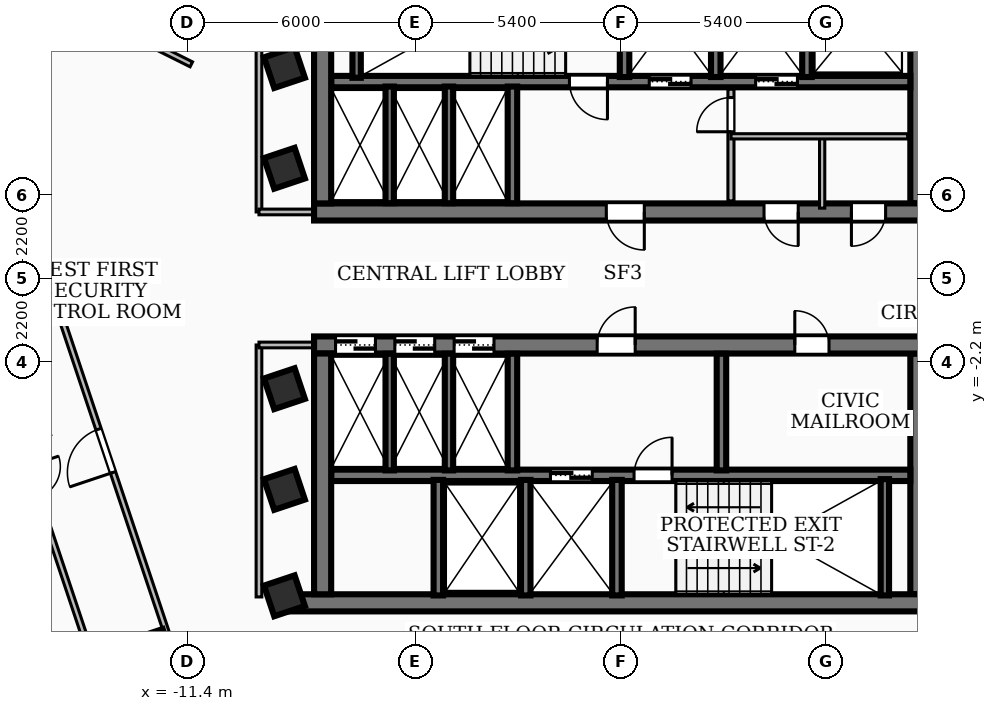
"""IFC4 building model, lengths in metres.
Left out: names, types, materials, properties, quantities, classifications, styles, units other than length and angle.
Written with IfcOpenShell. Run it as: python <this file> out.ifc"""

import sys

from ifc_helpers import new_model, si_unit, direction, frame, frame_2d, origin, origin_2d, place, context, subcontext, project, spatial, rectangle, i_section, extrude, element, fill, save


model = new_model("IFC4")
c1 = context("Model", 3, precision=1e-05, world=origin(), true_north=direction((0.0, 1.0)))
c2 = subcontext(c1, "Body", "Model", "MODEL_VIEW")
j1 = project(units=[si_unit("LENGTHUNIT", "METRE"), si_unit("PLANEANGLEUNIT", "RADIAN")], contexts=[c1])
p1 = place(None, origin())
s1 = spatial("IfcSite", under=j1, at=p1, CompositionType="ELEMENT")
p2 = place(p1, origin())
s2 = spatial("IfcBuilding", under=s1, at=p2, CompositionType="ELEMENT")
p3 = place(p2, frame((0.0, 0.0, 159.48)))
s3 = spatial("IfcBuildingStorey", under=s2, at=p3, CompositionType="ELEMENT", Elevation=159.48)
p4 = place(p3, frame((8.07, 1.75, 0.0), z_axis=(0.0, 0.0, 1.0), x_axis=(-1.0, 0.0, 0.0)))
e1 = element("IfcWall", 1, at=p4, inside=s3, PredefinedType="SHEAR", context=c2, shape_type="SweptSolid", body=[
    extrude(rectangle(XDim=16.14, YDim=0.45, at=frame_2d((8.07, 0.0))), origin(), (0.0, 0.0, 1.0), 3.34),
])
p5 = place(p4, frame((7.45, 0.0, 0.0)))
e2 = element("IfcOpeningElement", 2, at=p5, cuts=e1, PredefinedType="OPENING", context=c2, shape_type="SweptSolid", body=[
    extrude(rectangle(XDim=1.0, YDim=2.1, at=frame_2d((0.5, 1.05))), frame((0.0, 0.235, 0.0), z_axis=(0.0, -1.0, 0.0), x_axis=(1.0, 0.0, 0.0)), (0.0, 0.0, 1.0), 0.47),
])
p6 = place(p4, frame((3.4, 0.0, 0.0)))
e3 = element("IfcOpeningElement", 3, at=p6, cuts=e1, PredefinedType="OPENING", context=c2, shape_type="SweptSolid", body=[
    extrude(rectangle(XDim=0.9, YDim=2.06, at=frame_2d((0.45, 1.03))), frame((0.0, 0.235, 0.0), z_axis=(0.0, -1.0, 0.0), x_axis=(1.0, 0.0, 0.0)), (0.0, 0.0, 1.0), 0.47),
])
p7 = place(p4, frame((1.1, 0.0, 0.0)))
e4 = element("IfcOpeningElement", 4, at=p7, cuts=e1, PredefinedType="OPENING", context=c2, shape_type="SweptSolid", body=[
    extrude(rectangle(XDim=0.9, YDim=2.06, at=frame_2d((0.45, 1.03))), frame((0.0, 0.235, 0.0), z_axis=(0.0, -1.0, 0.0), x_axis=(1.0, 0.0, 0.0)), (0.0, 0.0, 1.0), 0.47),
])
for number, where, z_axis, x_axis in (
    (5, (-7.845, 1.975, 0.0), (0.0, 0.0, 1.0), (0.0, 1.0, 0.0)),
    (6, (7.845, 8.31, 0.0), (0.0, 0.0, 1.0), (0.0, -1.0, 0.0)),
):
    element("IfcWall", number, at=place(p3, frame(where, z_axis=z_axis, x_axis=x_axis)), inside=s3, PredefinedType="SHEAR", context=c2, shape_type="SweptSolid", body=[
        extrude(rectangle(XDim=6.335, YDim=0.45, at=frame_2d((3.167, 0.0))), origin(), (0.0, 0.0, 1.0), 3.34),
    ])
p8 = place(p3, frame((7.62, 5.18, 0.0), z_axis=(0.0, 0.0, 1.0), x_axis=(-1.0, 0.0, 0.0)))
e7 = element("IfcWall", 7, at=p8, inside=s3, PredefinedType="SOLIDWALL", context=c2, shape_type="SweptSolid", body=[
    extrude(rectangle(XDim=15.24, YDim=0.3, at=frame_2d((7.62, 0.0))), origin(), (0.0, 0.0, 1.0), 3.34),
])
p9 = place(p8, frame((5.77, 0.0, 0.0)))
e8 = element("IfcOpeningElement", 8, at=p9, cuts=e7, PredefinedType="OPENING", context=c2, shape_type="SweptSolid", body=[
    extrude(rectangle(XDim=1.1, YDim=2.15, at=frame_2d((0.55, 1.075))), frame((0.0, 0.16, 0.0), z_axis=(0.0, -1.0, 0.0), x_axis=(1.0, 0.0, 0.0)), (0.0, 0.0, 1.0), 0.32),
])
p10 = place(p8, frame((2.97, 0.0, 0.0)))
e9 = element("IfcOpeningElement", 9, at=p10, cuts=e7, PredefinedType="OPENING", context=c2, shape_type="SweptSolid", body=[
    extrude(rectangle(XDim=1.1, YDim=2.15, at=frame_2d((0.55, 1.075))), frame((0.0, 0.16, 0.0), z_axis=(0.0, -1.0, 0.0), x_axis=(1.0, 0.0, 0.0)), (0.0, 0.0, 1.0), 0.32),
])
p11 = place(p8, frame((7.97, 0.0, 0.0)))
e10 = element("IfcOpeningElement", 10, at=p11, cuts=e7, PredefinedType="OPENING", context=c2, shape_type="SweptSolid", body=[
    extrude(rectangle(XDim=1.0, YDim=2.1, at=frame_2d((0.5, 1.05))), frame((0.0, 0.16, 0.0), z_axis=(0.0, -1.0, 0.0), x_axis=(1.0, 0.0, 0.0)), (0.0, 0.0, 1.0), 0.32),
])
p12 = place(p3, frame((8.78, -8.535, 0.0), z_axis=(0.0, 0.0, 1.0), x_axis=(-1.0, 0.0, 0.0)))
e11 = element("IfcWall", 11, at=p12, inside=s3, PredefinedType="SHEAR", context=c2, shape_type="SweptSolid", body=[
    extrude(rectangle(XDim=17.56, YDim=0.45, at=frame_2d((8.78, 0.0))), origin(), (0.0, 0.0, 1.0), 3.34),
])
p13 = place(p3, frame((-8.07, -1.75, 0.0), z_axis=(0.0, 0.0, 1.0), x_axis=(1.0, 0.0, 0.0)))
e12 = element("IfcWall", 12, at=p13, inside=s3, PredefinedType="SHEAR", context=c2, shape_type="SweptSolid", body=[
    extrude(rectangle(XDim=16.14, YDim=0.45, at=frame_2d((8.07, 0.0))), origin(), (0.0, 0.0, 1.0), 3.34),
])
p14 = place(p13, frame((7.45, 0.0, 0.0)))
e13 = element("IfcOpeningElement", 13, at=p14, cuts=e12, PredefinedType="OPENING", context=c2, shape_type="SweptSolid", body=[
    extrude(rectangle(XDim=1.0, YDim=2.1, at=frame_2d((0.5, 1.05))), frame((0.0, 0.235, 0.0), z_axis=(0.0, -1.0, 0.0), x_axis=(1.0, 0.0, 0.0)), (0.0, 0.0, 1.0), 0.47),
])
p15 = place(p13, frame((12.65, 0.0, 0.0)))
e14 = element("IfcOpeningElement", 14, at=p15, cuts=e12, PredefinedType="OPENING", context=c2, shape_type="SweptSolid", body=[
    extrude(rectangle(XDim=0.9, YDim=2.06, at=frame_2d((0.45, 1.03))), frame((0.0, 0.235, 0.0), z_axis=(0.0, -1.0, 0.0), x_axis=(1.0, 0.0, 0.0)), (0.0, 0.0, 1.0), 0.47),
])
p16 = place(p13, frame((0.565, 0.0, 0.0)))
e15 = element("IfcOpeningElement", 15, at=p16, cuts=e12, PredefinedType="OPENING", context=c2, shape_type="SweptSolid", body=[
    extrude(rectangle(XDim=1.05, YDim=2.15, at=frame_2d((0.525, 1.075))), frame((0.0, 0.235, 0.0), z_axis=(0.0, -1.0, 0.0), x_axis=(1.0, 0.0, 0.0)), (0.0, 0.0, 1.0), 0.47),
])
p17 = place(p13, frame((2.125, 0.0, 0.0)))
e16 = element("IfcOpeningElement", 16, at=p17, cuts=e12, PredefinedType="OPENING", context=c2, shape_type="SweptSolid", body=[
    extrude(rectangle(XDim=1.05, YDim=2.15, at=frame_2d((0.525, 1.075))), frame((0.0, 0.235, 0.0), z_axis=(0.0, -1.0, 0.0), x_axis=(1.0, 0.0, 0.0)), (0.0, 0.0, 1.0), 0.47),
])
p18 = place(p13, frame((3.685, 0.0, 0.0)))
e17 = element("IfcOpeningElement", 17, at=p18, cuts=e12, PredefinedType="OPENING", context=c2, shape_type="SweptSolid", body=[
    extrude(rectangle(XDim=1.05, YDim=2.15, at=frame_2d((0.525, 1.075))), frame((0.0, 0.235, 0.0), z_axis=(0.0, -1.0, 0.0), x_axis=(1.0, 0.0, 0.0)), (0.0, 0.0, 1.0), 0.47),
])
for number, where, z_axis, x_axis in (
    (18, (-7.845, -8.31, 0.0), (0.0, 0.0, 1.0), (0.0, 1.0, 0.0)),
    (19, (7.845, -1.975, 0.0), (0.0, 0.0, 1.0), (0.0, -1.0, 0.0)),
):
    element("IfcWall", number, at=place(p3, frame(where, z_axis=z_axis, x_axis=x_axis)), inside=s3, PredefinedType="SHEAR", context=c2, shape_type="SweptSolid", body=[
        extrude(rectangle(XDim=6.335, YDim=0.45, at=frame_2d((3.167, 0.0))), origin(), (0.0, 0.0, 1.0), 3.34),
    ])
p19 = place(p3, frame((-7.62, -5.18, 0.0), z_axis=(0.0, 0.0, 1.0), x_axis=(1.0, 0.0, 0.0)))
e20 = element("IfcWall", 20, at=p19, inside=s3, PredefinedType="SOLIDWALL", context=c2, shape_type="SweptSolid", body=[
    extrude(rectangle(XDim=15.24, YDim=0.3, at=frame_2d((7.62, 0.0))), origin(), (0.0, 0.0, 1.0), 3.34),
])
p20 = place(p19, frame((5.77, 0.0, 0.0)))
e21 = element("IfcOpeningElement", 21, at=p20, cuts=e20, PredefinedType="OPENING", context=c2, shape_type="SweptSolid", body=[
    extrude(rectangle(XDim=1.1, YDim=2.15, at=frame_2d((0.55, 1.075))), frame((0.0, 0.16, 0.0), z_axis=(0.0, -1.0, 0.0), x_axis=(1.0, 0.0, 0.0)), (0.0, 0.0, 1.0), 0.32),
])
p21 = place(p19, frame((7.97, 0.0, 0.0)))
e22 = element("IfcOpeningElement", 22, at=p21, cuts=e20, PredefinedType="OPENING", context=c2, shape_type="SweptSolid", body=[
    extrude(rectangle(XDim=1.0, YDim=2.1, at=frame_2d((0.5, 1.05))), frame((0.0, 0.16, 0.0), z_axis=(0.0, -1.0, 0.0), x_axis=(1.0, 0.0, 0.0)), (0.0, 0.0, 1.0), 0.32),
])
for number, where, z_axis, x_axis in (
    (23, (-6.95, 5.28, 0.0), (0.0, 0.0, 1.0), (0.0, 1.0, 0.0)),
    (24, (6.95, -8.34, 0.0), (0.0, 0.0, 1.0), (0.0, 1.0, 0.0)),
):
    element("IfcWall", number, at=place(p3, frame(where, z_axis=z_axis, x_axis=x_axis)), inside=s3, PredefinedType="SOLIDWALL", context=c2, shape_type="SweptSolid", body=[
        extrude(rectangle(XDim=3.06, YDim=0.22, at=frame_2d((1.53, 0.0))), origin(), (0.0, 0.0, 1.0), 3.34),
    ])
for number, where, z_axis, x_axis in (
    (25, (0.1, 5.3, 0.0), (0.0, 0.0, 1.0), (0.0, 1.0, 0.0)),
    (26, (2.5, 5.3, 0.0), (0.0, 0.0, 1.0), (0.0, 1.0, 0.0)),
    (27, (4.9, 5.3, 0.0), (0.0, 0.0, 1.0), (0.0, 1.0, 0.0)),
):
    element("IfcWall", number, at=place(p3, frame(where, z_axis=z_axis, x_axis=x_axis)), inside=s3, PredefinedType="SOLIDWALL", context=c2, shape_type="SweptSolid", body=[
        extrude(rectangle(XDim=3.04, YDim=0.25, at=frame_2d((1.52, 0.0))), origin(), (0.0, 0.0, 1.0), 3.34),
    ])
p22 = place(p3, frame((-2.85, 1.98, 0.0), z_axis=(0.0, 0.0, 1.0), x_axis=(0.0, 1.0, 0.0)))
e28 = element("IfcWall", 28, at=p22, inside=s3, PredefinedType="SOLIDWALL", context=c2, shape_type="SweptSolid", body=[
    extrude(rectangle(XDim=3.07, YDim=0.25, at=frame_2d((1.535, 0.0))), origin(), (0.0, 0.0, 1.0), 3.34),
])
for number, where, z_axis, x_axis in (
    (29, (-0.1, -8.34, 0.0), (0.0, 0.0, 1.0), (0.0, 1.0, 0.0)),
    (30, (-2.5, -8.34, 0.0), (0.0, 0.0, 1.0), (0.0, 1.0, 0.0)),
    (31, (-4.8, -8.34, 0.0), (0.0, 0.0, 1.0), (0.0, 1.0, 0.0)),
):
    element("IfcWall", number, at=place(p3, frame(where, z_axis=z_axis, x_axis=x_axis)), inside=s3, PredefinedType="SOLIDWALL", context=c2, shape_type="SweptSolid", body=[
        extrude(rectangle(XDim=3.04, YDim=0.25, at=frame_2d((1.52, 0.0))), origin(), (0.0, 0.0, 1.0), 3.34),
    ])
for number, where, z_axis, x_axis in (
    (32, (-2.85, -5.05, 0.0), (0.0, 0.0, 1.0), (0.0, 1.0, 0.0)),
    (33, (2.65, -5.05, 0.0), (0.0, 0.0, 1.0), (0.0, 1.0, 0.0)),
):
    element("IfcWall", number, at=place(p3, frame(where, z_axis=z_axis, x_axis=x_axis)), inside=s3, PredefinedType="SOLIDWALL", context=c2, shape_type="SweptSolid", body=[
        extrude(rectangle(XDim=3.07, YDim=0.25, at=frame_2d((1.535, 0.0))), origin(), (0.0, 0.0, 1.0), 3.34),
    ])
for number, where, z_axis, x_axis in (
    (34, (-6.08, 1.98, 0.0), (0.0, 0.0, 1.0), (0.0, 1.0, 0.0)),
    (35, (-4.52, 1.98, 0.0), (0.0, 0.0, 1.0), (0.0, 1.0, 0.0)),
    (36, (-6.08, -5.05, 0.0), (0.0, 0.0, 1.0), (0.0, 1.0, 0.0)),
    (37, (-4.52, -5.05, 0.0), (0.0, 0.0, 1.0), (0.0, 1.0, 0.0)),
):
    element("IfcWall", number, at=place(p3, frame(where, z_axis=z_axis, x_axis=x_axis)), inside=s3, PredefinedType="SOLIDWALL", context=c2, shape_type="SweptSolid", body=[
        extrude(rectangle(XDim=3.07, YDim=0.22, at=frame_2d((1.535, 0.0))), origin(), (0.0, 0.0, 1.0), 3.34),
    ])
for number, where, z_axis, x_axis in (
    (38, (-8.85, -5.55, 0.0), (0.0, 0.0, 1.0), (0.948, 0.317, 0.0)),
    (39, (-8.85, -2.9, 0.0), (0.0, 0.0, 1.0), (0.948, 0.317, 0.0)),
    (40, (-8.85, 2.9, 0.0), (0.0, 0.0, 1.0), (0.948, 0.317, 0.0)),
    (41, (-8.85, 5.55, 0.0), (0.0, 0.0, 1.0), (0.948, 0.317, 0.0)),
    (42, (-8.85, -8.35, 0.0), (0.0, 0.0, 1.0), (0.948, 0.317, 0.0)),
):
    element("IfcColumn", number, at=place(p3, frame(where, z_axis=z_axis, x_axis=x_axis)), inside=s3, PredefinedType="COLUMN", context=c2, shape_type="SweptSolid", body=[
        extrude(rectangle(XDim=0.85, YDim=0.85, at=origin_2d()), origin(), (0.0, 0.0, 1.0), 3.6),
    ])
p23 = place(p3, frame((-12.106, -9.731, 0.0), z_axis=(0.0, 0.0, 1.0), x_axis=(0.948323655206, 0.317304656405, 0.0)))
e43 = element("IfcColumn", 43, at=p23, inside=s3, PredefinedType="COLUMN", context=c2, shape_type="SweptSolid", body=[
    extrude(i_section(OverallWidth=0.418, OverallDepth=0.927, WebThickness=0.019, FlangeThickness=0.032, at=origin_2d()), origin(), (0.0, 0.0, 1.0), 3.6),
])
p24 = place(p3, frame((2.9, 2.04, 0.0), z_axis=(0.0, 0.0, 1.0), x_axis=(0.0, 1.0, 0.0)))
e44 = element("IfcWall", 44, at=p24, inside=s3, PredefinedType="PARTITIONING", context=c2, shape_type="SweptSolid", body=[
    extrude(rectangle(XDim=2.94, YDim=0.16, at=frame_2d((1.47, 0.0))), origin(), (0.0, 0.0, 1.0), 2.57),
])
p25 = place(p24, frame((1.82, 0.0, 0.0)))
e45 = element("IfcOpeningElement", 45, at=p25, cuts=e44, PredefinedType="OPENING", context=c2, shape_type="SweptSolid", body=[
    extrude(rectangle(XDim=0.9, YDim=2.06, at=frame_2d((0.45, 1.03))), frame((0.0, 0.09, 0.0), z_axis=(0.0, -1.0, 0.0), x_axis=(1.0, 0.0, 0.0)), (0.0, 0.0, 1.0), 0.18),
])
p26 = place(p3, frame((2.9, 3.74, 0.0), z_axis=(0.0, 0.0, 1.0), x_axis=(1.0, 0.0, 0.0)))
e46 = element("IfcWall", 46, at=p26, inside=s3, PredefinedType="PARTITIONING", context=c2, shape_type="SweptSolid", body=[
    extrude(rectangle(XDim=4.65, YDim=0.138, at=frame_2d((2.325, 0.0))), origin(), (0.0, 0.0, 1.0), 3.34),
])
p27 = place(p3, frame((5.3, 1.85, 0.0), z_axis=(0.0, 0.0, 1.0), x_axis=(0.0, 1.0, 0.0)))
e47 = element("IfcWall", 47, at=p27, inside=s3, PredefinedType="PARTITIONING", context=c2, shape_type="SweptSolid", body=[
    extrude(rectangle(XDim=1.89, YDim=0.138, at=frame_2d((0.945, 0.0))), origin(), (0.0, 0.0, 1.0), 2.57),
])
p28 = place(p3, frame((-9.52, 1.75, 0.0), z_axis=(0.0, 0.0, 1.0), x_axis=(0.0, 1.0, 0.0)))
e48 = element("IfcWall", 48, at=p28, inside=s3, PredefinedType="PARTITIONING", context=c2, shape_type="SweptSolid", body=[
    extrude(rectangle(XDim=6.63, YDim=0.15, at=frame_2d((3.315, 0.0))), origin(), (0.0, 0.0, 1.0), 3.34),
])
p29 = place(p3, frame((-7.85, 1.75, 0.0), z_axis=(0.0, 0.0, 1.0), x_axis=(-1.0, 0.0, 0.0)))
e49 = element("IfcWall", 49, at=p29, inside=s3, PredefinedType="PARTITIONING", context=c2, shape_type="SweptSolid", body=[
    extrude(rectangle(XDim=1.67, YDim=0.15, at=frame_2d((0.835, 0.0))), origin(), (0.0, 0.0, 1.0), 2.57),
])
p30 = place(p3, frame((-9.52, -8.38, 0.0), z_axis=(0.0, 0.0, 1.0), x_axis=(0.0, 1.0, 0.0)))
e50 = element("IfcWall", 50, at=p30, inside=s3, PredefinedType="PARTITIONING", context=c2, shape_type="SweptSolid", body=[
    extrude(rectangle(XDim=6.63, YDim=0.15, at=frame_2d((3.315, 0.0))), origin(), (0.0, 0.0, 1.0), 2.644),
])
p31 = place(p3, frame((-7.85, -1.75, 0.0), z_axis=(0.0, 0.0, 1.0), x_axis=(-1.0, 0.0, 0.0)))
e51 = element("IfcWall", 51, at=p31, inside=s3, PredefinedType="PARTITIONING", context=c2, shape_type="SweptSolid", body=[
    extrude(rectangle(XDim=1.67, YDim=0.15, at=frame_2d((0.835, 0.0))), origin(), (0.0, 0.0, 1.0), 2.57),
])
p32 = place(p3, frame((-11.3, 5.634, 0.0), z_axis=(0.0, 0.0, 1.0), x_axis=(-0.894904738475, 0.446257222972, 0.0)))
e52 = element("IfcWall", 52, at=p32, inside=s3, PredefinedType="PARTITIONING", context=c2, shape_type="SweptSolid", body=[
    extrude(rectangle(XDim=7.048, YDim=0.145, at=frame_2d((3.524, 0.0))), origin(), (0.0, 0.0, 1.0), 3.34),
])
p33 = place(p3, frame((-10.372, -14.037, 0.0), z_axis=(0.0, 0.0, 1.0), x_axis=(-0.317298382655, 0.94832575435, 0.0)))
e53 = element("IfcWall", 53, at=p33, inside=s3, PredefinedType="PARTITIONING", context=c2, shape_type="SweptSolid", body=[
    extrude(rectangle(XDim=20.041, YDim=0.145, at=frame_2d((10.021, 0.0))), origin(), (0.0, 0.0, 1.0), 2.644),
])
p34 = place(p33, frame((9.42, 0.0, 0.0)))
e54 = element("IfcOpeningElement", 54, at=p34, cuts=e53, PredefinedType="OPENING", context=c2, shape_type="SweptSolid", body=[
    extrude(rectangle(XDim=1.2, YDim=2.1, at=frame_2d((0.6, 1.05))), frame((0.0, 0.083, 0.0), z_axis=(0.0, -1.0, 0.0), x_axis=(1.0, 0.0, 0.0)), (0.0, 0.0, 1.0), 0.165),
])
p35 = place(p3, frame((-17.496, 0.7, 0.0), z_axis=(0.0, 0.0, 1.0), x_axis=(0.317299961245, -0.948325226172, 0.0)))
e55 = element("IfcWall", 55, at=p35, inside=s3, PredefinedType="PARTITIONING", context=c2, shape_type="SweptSolid", body=[
    extrude(rectangle(XDim=12.43, YDim=0.145, at=frame_2d((6.215, 0.0))), origin(), (0.0, 0.0, 1.0), 2.644),
])
p36 = place(p35, frame((4.515, 0.0, 0.0)))
e56 = element("IfcOpeningElement", 56, at=p36, cuts=e55, PredefinedType="OPENING", context=c2, shape_type="SweptSolid", body=[
    extrude(rectangle(XDim=0.86, YDim=2.04, at=frame_2d((0.43, 1.02))), frame((0.0, 0.083, 0.0), z_axis=(0.0, -1.0, 0.0), x_axis=(1.0, 0.0, 0.0)), (0.0, 0.0, 1.0), 0.165),
])
p37 = place(p35, frame((5.955, 0.0, 0.0)))
e57 = element("IfcOpeningElement", 57, at=p37, cuts=e55, PredefinedType="OPENING", context=c2, shape_type="SweptSolid", body=[
    extrude(rectangle(XDim=0.86, YDim=2.04, at=frame_2d((0.43, 1.02))), frame((0.0, 0.083, 0.0), z_axis=(0.0, -1.0, 0.0), x_axis=(1.0, 0.0, 0.0)), (0.0, 0.0, 1.0), 0.165),
])
p38 = place(p5, origin())
e58 = element("IfcDoor", 58, at=p38, inside=s3, OperationType="SINGLE_SWING_LEFT", PredefinedType="DOOR", context=c2, shape_type="SweptSolid", body=[
    extrude(rectangle(XDim=1.0, YDim=2.1, at=frame_2d((0.5, 1.05))), frame((0.0, 0.025, 0.0), z_axis=(0.0, -1.0, 0.0), x_axis=(1.0, 0.0, 0.0)), (0.0, 0.0, 1.0), 0.05),
])
fill(e2, e58)
p39 = place(p14, origin())
e59 = element("IfcDoor", 59, at=p39, inside=s3, OperationType="SINGLE_SWING_RIGHT", PredefinedType="DOOR", context=c2, shape_type="SweptSolid", body=[
    extrude(rectangle(XDim=1.0, YDim=2.1, at=frame_2d((0.5, 1.05))), frame((0.0, 0.025, 0.0), z_axis=(0.0, -1.0, 0.0), x_axis=(1.0, 0.0, 0.0)), (0.0, 0.0, 1.0), 0.05),
])
fill(e13, e59)
p40 = place(p9, origin())
e60 = element("IfcDoor", 60, at=p40, inside=s3, OperationType="DOUBLE_DOOR_SLIDING", PredefinedType="DOOR", context=c2, shape_type="SweptSolid", body=[
    extrude(rectangle(XDim=1.1, YDim=2.15, at=frame_2d((0.55, 1.075))), frame((0.0, 0.025, 0.0), z_axis=(0.0, -1.0, 0.0), x_axis=(1.0, 0.0, 0.0)), (0.0, 0.0, 1.0), 0.05),
])
fill(e8, e60)
p41 = place(p10, origin())
e61 = element("IfcDoor", 61, at=p41, inside=s3, OperationType="DOUBLE_DOOR_SLIDING", PredefinedType="DOOR", context=c2, shape_type="SweptSolid", body=[
    extrude(rectangle(XDim=1.1, YDim=2.15, at=frame_2d((0.55, 1.075))), frame((0.0, 0.025, 0.0), z_axis=(0.0, -1.0, 0.0), x_axis=(1.0, 0.0, 0.0)), (0.0, 0.0, 1.0), 0.05),
])
fill(e9, e61)
p42 = place(p11, origin())
e62 = element("IfcDoor", 62, at=p42, inside=s3, OperationType="SINGLE_SWING_LEFT", PredefinedType="DOOR", context=c2, shape_type="SweptSolid", body=[
    extrude(rectangle(XDim=1.0, YDim=2.1, at=frame_2d((0.5, 1.05))), frame((0.0, 0.025, 0.0), z_axis=(0.0, -1.0, 0.0), x_axis=(1.0, 0.0, 0.0)), (0.0, 0.0, 1.0), 0.05),
])
fill(e10, e62)
p43 = place(p20, origin())
e63 = element("IfcDoor", 63, at=p43, inside=s3, OperationType="DOUBLE_DOOR_SLIDING", PredefinedType="DOOR", context=c2, shape_type="SweptSolid", body=[
    extrude(rectangle(XDim=1.1, YDim=2.15, at=frame_2d((0.55, 1.075))), frame((0.0, 0.025, 0.0), z_axis=(0.0, -1.0, 0.0), x_axis=(1.0, 0.0, 0.0)), (0.0, 0.0, 1.0), 0.05),
])
fill(e21, e63)
p44 = place(p21, origin())
e64 = element("IfcDoor", 64, at=p44, inside=s3, OperationType="SINGLE_SWING_RIGHT", PredefinedType="DOOR", context=c2, shape_type="SweptSolid", body=[
    extrude(rectangle(XDim=1.0, YDim=2.1, at=frame_2d((0.5, 1.05))), frame((0.0, 0.025, 0.0), z_axis=(0.0, -1.0, 0.0), x_axis=(1.0, 0.0, 0.0)), (0.0, 0.0, 1.0), 0.05),
])
fill(e22, e64)
p45 = place(p15, origin())
e65 = element("IfcDoor", 65, at=p45, inside=s3, OperationType="SINGLE_SWING_LEFT", PredefinedType="DOOR", context=c2, shape_type="SweptSolid", body=[
    extrude(rectangle(XDim=0.9, YDim=2.06, at=frame_2d((0.45, 1.03))), frame((0.0, 0.025, 0.0), z_axis=(0.0, -1.0, 0.0), x_axis=(1.0, 0.0, 0.0)), (0.0, 0.0, 1.0), 0.05),
])
fill(e14, e65)
p46 = place(p16, origin())
e66 = element("IfcDoor", 66, at=p46, inside=s3, OperationType="DOUBLE_DOOR_SLIDING", PredefinedType="DOOR", context=c2, shape_type="SweptSolid", body=[
    extrude(rectangle(XDim=1.05, YDim=2.15, at=frame_2d((0.525, 1.075))), frame((0.0, 0.025, 0.0), z_axis=(0.0, -1.0, 0.0), x_axis=(1.0, 0.0, 0.0)), (0.0, 0.0, 1.0), 0.05),
])
fill(e15, e66)
p47 = place(p17, origin())
e67 = element("IfcDoor", 67, at=p47, inside=s3, OperationType="DOUBLE_DOOR_SLIDING", PredefinedType="DOOR", context=c2, shape_type="SweptSolid", body=[
    extrude(rectangle(XDim=1.05, YDim=2.15, at=frame_2d((0.525, 1.075))), frame((0.0, 0.025, 0.0), z_axis=(0.0, -1.0, 0.0), x_axis=(1.0, 0.0, 0.0)), (0.0, 0.0, 1.0), 0.05),
])
fill(e16, e67)
p48 = place(p18, origin())
e68 = element("IfcDoor", 68, at=p48, inside=s3, OperationType="DOUBLE_DOOR_SLIDING", PredefinedType="DOOR", context=c2, shape_type="SweptSolid", body=[
    extrude(rectangle(XDim=1.05, YDim=2.15, at=frame_2d((0.525, 1.075))), frame((0.0, 0.025, 0.0), z_axis=(0.0, -1.0, 0.0), x_axis=(1.0, 0.0, 0.0)), (0.0, 0.0, 1.0), 0.05),
])
fill(e17, e68)
p49 = place(p6, origin())
e69 = element("IfcDoor", 69, at=p49, inside=s3, OperationType="SINGLE_SWING_LEFT", PredefinedType="DOOR", context=c2, shape_type="SweptSolid", body=[
    extrude(rectangle(XDim=0.9, YDim=2.06, at=frame_2d((0.45, 1.03))), frame((0.0, 0.025, 0.0), z_axis=(0.0, -1.0, 0.0), x_axis=(1.0, 0.0, 0.0)), (0.0, 0.0, 1.0), 0.05),
])
fill(e3, e69)
p50 = place(p7, origin())
e70 = element("IfcDoor", 70, at=p50, inside=s3, OperationType="SINGLE_SWING_RIGHT", PredefinedType="DOOR", context=c2, shape_type="SweptSolid", body=[
    extrude(rectangle(XDim=0.9, YDim=2.06, at=frame_2d((0.45, 1.03))), frame((0.0, 0.025, 0.0), z_axis=(0.0, -1.0, 0.0), x_axis=(1.0, 0.0, 0.0)), (0.0, 0.0, 1.0), 0.05),
])
fill(e4, e70)
p51 = place(p25, origin())
e71 = element("IfcDoor", 71, at=p51, inside=s3, OperationType="SINGLE_SWING_LEFT", PredefinedType="DOOR", context=c2, shape_type="SweptSolid", body=[
    extrude(rectangle(XDim=0.9, YDim=2.06, at=frame_2d((0.45, 1.03))), frame((0.0, 0.025, 0.0), z_axis=(0.0, -1.0, 0.0), x_axis=(1.0, 0.0, 0.0)), (0.0, 0.0, 1.0), 0.05),
])
fill(e45, e71)
p52 = place(p34, origin())
e72 = element("IfcDoor", 72, at=p52, inside=s3, OperationType="SINGLE_SWING_LEFT", PredefinedType="DOOR", context=c2, shape_type="SweptSolid", body=[
    extrude(rectangle(XDim=1.2, YDim=2.1, at=frame_2d((0.6, 1.05))), frame((0.0, 0.025, 0.0), z_axis=(0.0, -1.0, 0.0), x_axis=(1.0, 0.0, 0.0)), (0.0, 0.0, 1.0), 0.05),
])
fill(e54, e72)
save(model, sys.argv[1])
